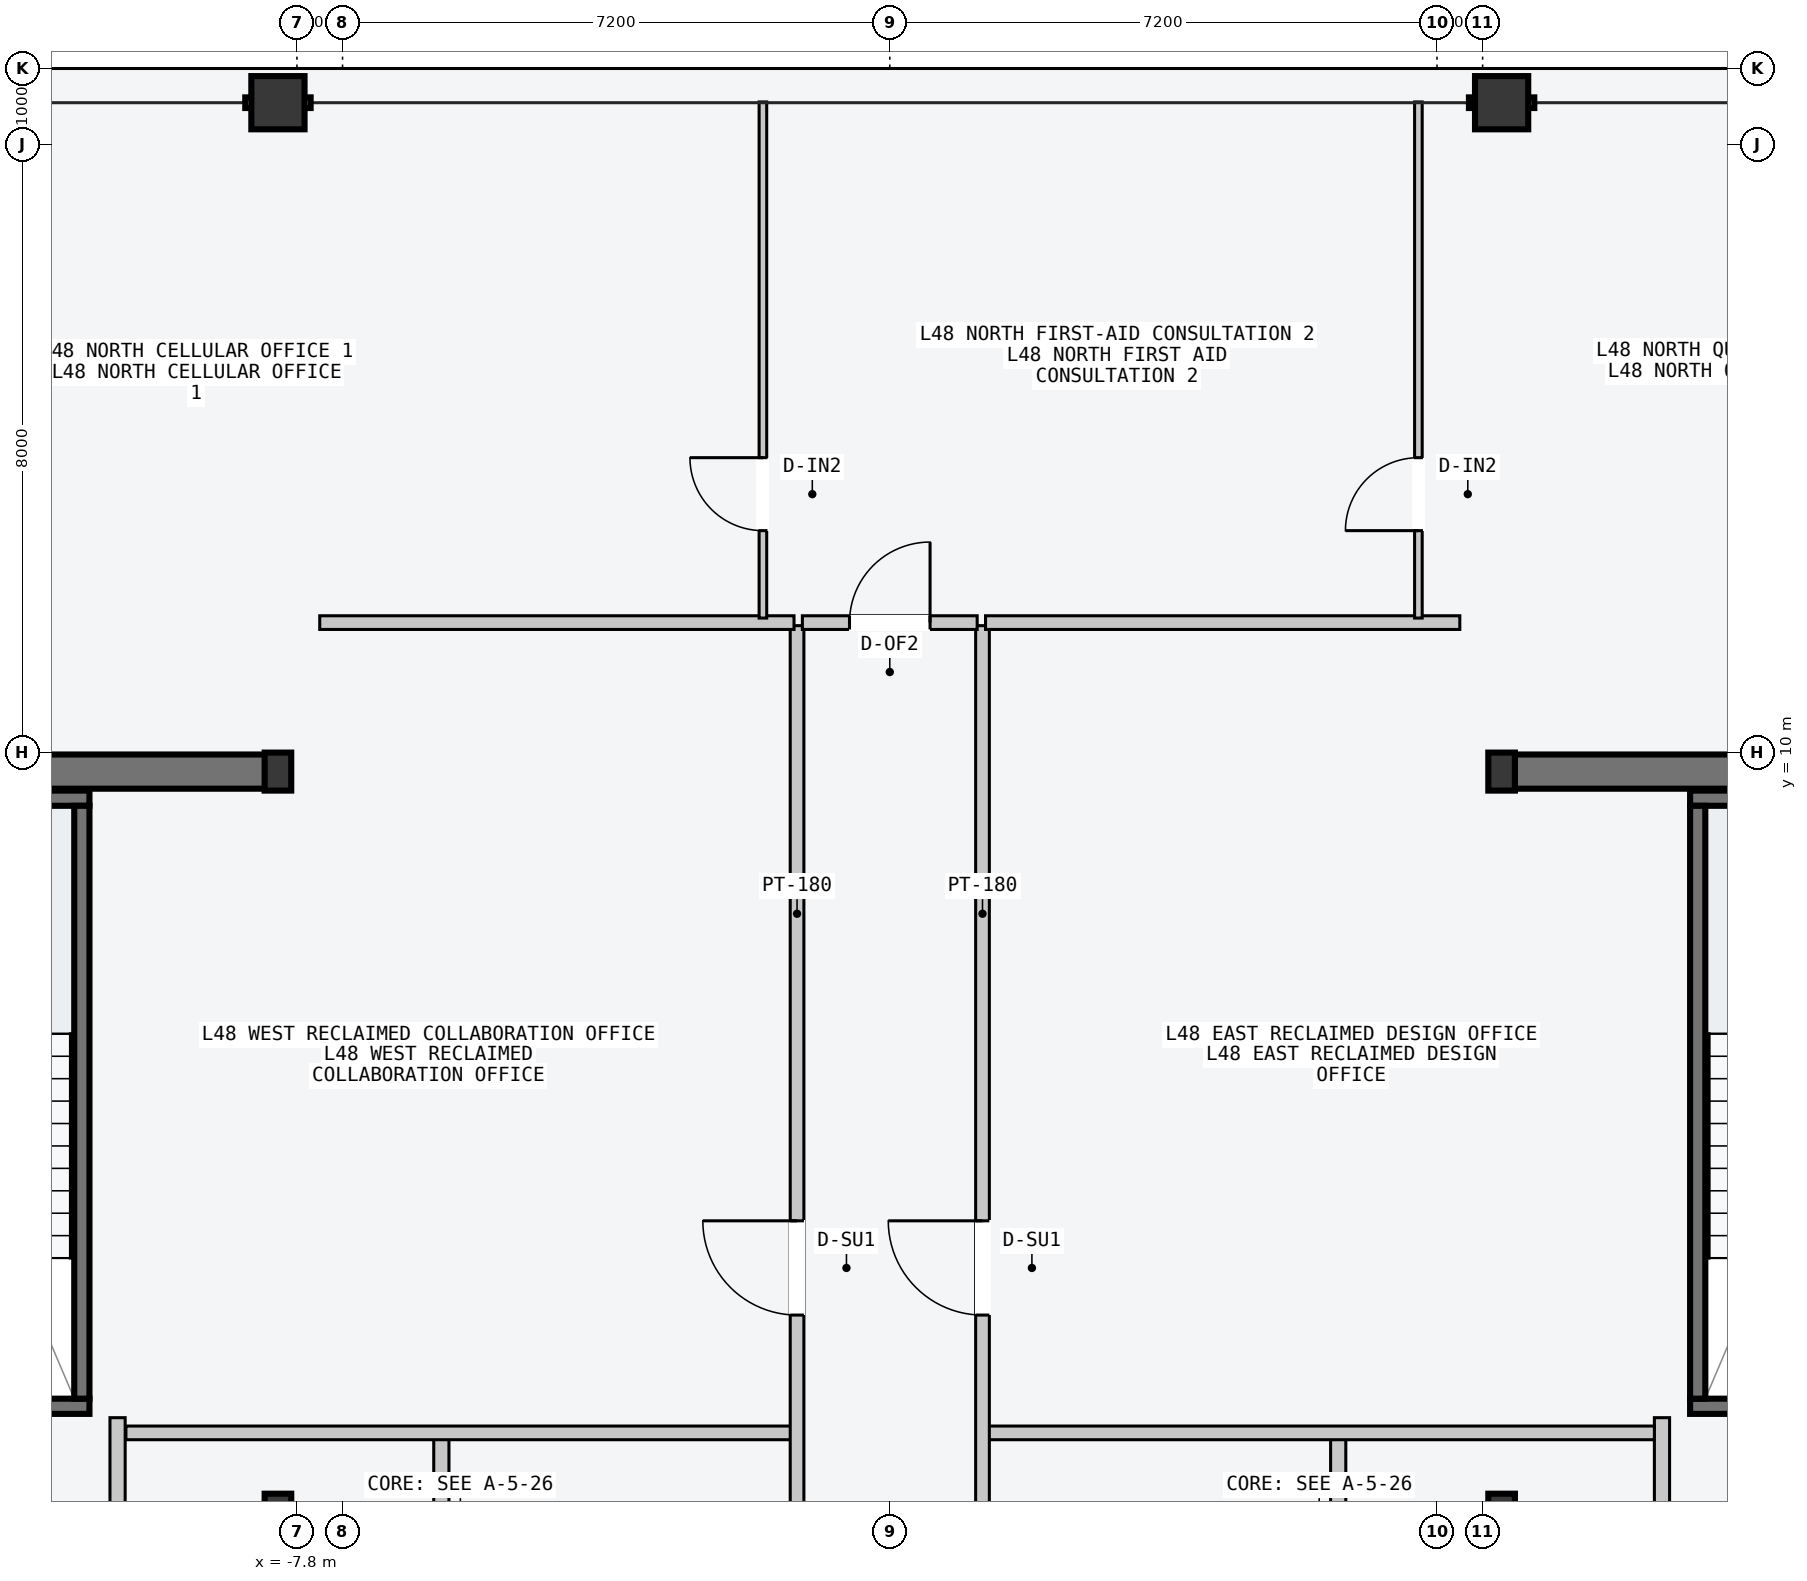
"""IFC4 building model, lengths in metres.
Left out: names, types, materials, properties, quantities, classifications, styles, units other than length and angle.
Written with IfcOpenShell. Run it as: python <this file> out.ifc"""

import sys

from ifc_helpers import new_model, si_unit, direction, frame, frame_2d, origin, origin_2d, place, context, subcontext, project, spatial, rectangle, hollow_rectangle, i_section, extrude, element, fill, save


model = new_model("IFC4")
c1 = context("Model", 3, precision=1e-05, world=origin(), true_north=direction((0.0, 1.0)))
c2 = subcontext(c1, "Body", "Model", "MODEL_VIEW")
j1 = project(units=[si_unit("LENGTHUNIT", "METRE"), si_unit("PLANEANGLEUNIT", "RADIAN")], contexts=[c1])
p1 = place(None, origin())
s1 = spatial("IfcSite", under=j1, at=p1, CompositionType="ELEMENT")
p2 = place(p1, origin())
s2 = spatial("IfcBuilding", under=s1, at=p2, CompositionType="ELEMENT")
p3 = place(p2, frame((0.0, 0.0, 183.9)))
s3 = spatial("IfcBuildingStorey", under=s2, at=p3, CompositionType="ELEMENT", Elevation=183.9)
for number, where, z_axis, x_axis in (
    (1, (-14.53, 9.75, -0.2), (0.0, 0.0, 1.0), (1.0, 0.0, 0.0)),
    (2, (8.07, 9.75, -0.2), (0.0, 0.0, 1.0), (1.0, 0.0, 0.0)),
):
    element("IfcWall", number, at=place(p3, frame(where, z_axis=z_axis, x_axis=x_axis)), inside=s3, PredefinedType="SHEAR", context=c2, shape_type="SweptSolid", body=[
        extrude(rectangle(XDim=6.46, YDim=0.45, at=frame_2d((3.23, 0.0))), origin(), (0.0, 0.0, 1.0), 3.6),
    ])
p4 = place(p3, frame((-14.25, 1.4, -0.2), z_axis=(0.0, 0.0, 1.0), x_axis=(1.0, 0.0, 0.0)))
e3 = element("IfcWall", 3, at=p4, inside=s3, PredefinedType="SOLIDWALL", context=c2, shape_type="SweptSolid", body=[
    extrude(rectangle(XDim=3.72, YDim=0.2, at=frame_2d((1.86, 0.0))), origin(), (0.0, 0.0, 1.0), 3.6),
])
p5 = place(p4, frame((1.5, 0.0, 0.2)))
e4 = element("IfcOpeningElement", 4, at=p5, cuts=e3, PredefinedType="OPENING", context=c2, shape_type="SweptSolid", body=[
    extrude(rectangle(XDim=1.12, YDim=2.18, at=frame_2d((0.56, 1.09))), frame((0.0, 0.11, 0.0), z_axis=(0.0, -1.0, 0.0), x_axis=(1.0, 0.0, 0.0)), (0.0, 0.0, 1.0), 0.22),
])
p6 = place(p3, frame((-14.25, 9.4, -0.2), z_axis=(0.0, 0.0, 1.0), x_axis=(1.0, 0.0, 0.0)))
e5 = element("IfcWall", 5, at=p6, inside=s3, PredefinedType="SOLIDWALL", context=c2, shape_type="SweptSolid", body=[
    extrude(rectangle(XDim=3.72, YDim=0.2, at=frame_2d((1.86, 0.0))), origin(), (0.0, 0.0, 1.0), 3.6),
])
p7 = place(p3, frame((-10.63, 1.5, -0.2), z_axis=(0.0, 0.0, 1.0), x_axis=(0.0, 1.0, 0.0)))
e6 = element("IfcWall", 6, at=p7, inside=s3, PredefinedType="SOLIDWALL", context=c2, shape_type="SweptSolid", body=[
    extrude(rectangle(XDim=7.8, YDim=0.2, at=frame_2d((3.9, 0.0))), origin(), (0.0, 0.0, 1.0), 3.6),
])
p8 = place(p3, frame((10.53, 1.4, -0.2), z_axis=(0.0, 0.0, 1.0), x_axis=(1.0, 0.0, 0.0)))
e7 = element("IfcWall", 7, at=p8, inside=s3, PredefinedType="SOLIDWALL", context=c2, shape_type="SweptSolid", body=[
    extrude(rectangle(XDim=3.72, YDim=0.2, at=frame_2d((1.86, 0.0))), origin(), (0.0, 0.0, 1.0), 3.6),
])
p9 = place(p8, frame((1.5, 0.0, 0.2)))
e8 = element("IfcOpeningElement", 8, at=p9, cuts=e7, PredefinedType="OPENING", context=c2, shape_type="SweptSolid", body=[
    extrude(rectangle(XDim=1.12, YDim=2.18, at=frame_2d((0.56, 1.09))), frame((0.0, 0.11, 0.0), z_axis=(0.0, -1.0, 0.0), x_axis=(1.0, 0.0, 0.0)), (0.0, 0.0, 1.0), 0.22),
])
p10 = place(p3, frame((10.53, 9.4, -0.2), z_axis=(0.0, 0.0, 1.0), x_axis=(1.0, 0.0, 0.0)))
e9 = element("IfcWall", 9, at=p10, inside=s3, PredefinedType="SOLIDWALL", context=c2, shape_type="SweptSolid", body=[
    extrude(rectangle(XDim=3.72, YDim=0.2, at=frame_2d((1.86, 0.0))), origin(), (0.0, 0.0, 1.0), 3.6),
])
p11 = place(p3, frame((10.63, 1.5, -0.2), z_axis=(0.0, 0.0, 1.0), x_axis=(0.0, 1.0, 0.0)))
e10 = element("IfcWall", 10, at=p11, inside=s3, PredefinedType="SOLIDWALL", context=c2, shape_type="SweptSolid", body=[
    extrude(rectangle(XDim=7.8, YDim=0.2, at=frame_2d((3.9, 0.0))), origin(), (0.0, 0.0, 1.0), 3.6),
])
for number, where, z_axis, x_axis in (
    (11, (-8.05, 0.0, 0.0), (0.0, 0.0, 1.0), (1.0, 0.0, 0.0)),
    (12, (-8.05, 9.75, 0.0), (0.0, 0.0, 1.0), (1.0, 0.0, 0.0)),
    (13, (8.05, 0.0, 0.0), (0.0, 0.0, 1.0), (1.0, 0.0, 0.0)),
    (14, (8.05, 9.75, 0.0), (0.0, 0.0, 1.0), (1.0, 0.0, 0.0)),
):
    element("IfcColumn", number, at=place(p3, frame(where, z_axis=z_axis, x_axis=x_axis)), inside=s3, PredefinedType="COLUMN", context=c2, shape_type="SweptSolid", body=[
        extrude(i_section(OverallWidth=0.35, OverallDepth=0.5, WebThickness=0.02, FlangeThickness=0.032, at=origin_2d()), origin(), (0.0, 0.0, 1.0), 3.6),
    ])
for number, where, z_axis, x_axis in (
    (15, (-8.05, 18.55, 0.0), (0.0, 0.0, 1.0), (1.0, 0.0, 0.0)),
    (16, (8.05, 18.55, 0.0), (0.0, 0.0, 1.0), (1.0, 0.0, 0.0)),
):
    element("IfcColumn", number, at=place(p3, frame(where, z_axis=z_axis, x_axis=x_axis)), inside=s3, PredefinedType="COLUMN", context=c2, shape_type="SweptSolid", body=[
        extrude(hollow_rectangle(XDim=0.7, YDim=0.7, WallThickness=0.03, at=origin_2d()), origin(), (0.0, 0.0, 1.0), 3.6),
    ])
p12 = place(p3, frame((-5.9, -9.45, 0.0), z_axis=(0.0, 0.0, 1.0), x_axis=(0.0, 1.0, 0.0)))
e17 = element("IfcWall", 17, at=p12, inside=s3, PredefinedType="PARTITIONING", context=c2, shape_type="SweptSolid", body=[
    extrude(rectangle(XDim=10.5, YDim=0.2, at=frame_2d((5.25, 0.0))), origin(), (0.0, 0.0, 1.0), 3.4),
])
p13 = place(p12, frame((3.9, 0.0, 0.0)))
e18 = element("IfcOpeningElement", 18, at=p13, cuts=e17, PredefinedType="OPENING", context=c2, shape_type="SweptSolid", body=[
    extrude(rectangle(XDim=1.5, YDim=2.2, at=frame_2d((0.75, 1.1))), frame((0.0, 0.11, 0.0), z_axis=(0.0, -1.0, 0.0), x_axis=(1.0, 0.0, 0.0)), (0.0, 0.0, 1.0), 0.22),
])
p14 = place(p3, frame((-10.16, -2.55, 0.0), z_axis=(0.0, 0.0, 1.0), x_axis=(0.0, 1.0, 0.0)))
e19 = element("IfcWall", 19, at=p14, inside=s3, PredefinedType="PARTITIONING", context=c2, shape_type="SweptSolid", body=[
    extrude(rectangle(XDim=3.8, YDim=0.2, at=frame_2d((1.9, 0.0))), origin(), (0.0, 0.0, 1.0), 3.4),
])
p15 = place(p14, frame((1.3, 0.0, 0.0)))
e20 = element("IfcOpeningElement", 20, at=p15, cuts=e19, PredefinedType="OPENING", context=c2, shape_type="SweptSolid", body=[
    extrude(rectangle(XDim=1.1, YDim=2.15, at=frame_2d((0.55, 1.075))), frame((0.0, 0.11, 0.0), z_axis=(0.0, -1.0, 0.0), x_axis=(1.0, 0.0, 0.0)), (0.0, 0.0, 1.0), 0.22),
])
p16 = place(p3, frame((5.9, -9.45, 0.0), z_axis=(0.0, 0.0, 1.0), x_axis=(0.0, 1.0, 0.0)))
e21 = element("IfcWall", 21, at=p16, inside=s3, PredefinedType="PARTITIONING", context=c2, shape_type="SweptSolid", body=[
    extrude(rectangle(XDim=10.5, YDim=0.2, at=frame_2d((5.25, 0.0))), origin(), (0.0, 0.0, 1.0), 3.4),
])
p17 = place(p16, frame((3.9, 0.0, 0.0)))
e22 = element("IfcOpeningElement", 22, at=p17, cuts=e21, PredefinedType="OPENING", context=c2, shape_type="SweptSolid", body=[
    extrude(rectangle(XDim=1.5, YDim=2.2, at=frame_2d((0.75, 1.1))), frame((0.0, 0.11, 0.0), z_axis=(0.0, -1.0, 0.0), x_axis=(1.0, 0.0, 0.0)), (0.0, 0.0, 1.0), 0.22),
])
p18 = place(p3, frame((10.16, -2.55, 0.0), z_axis=(0.0, 0.0, 1.0), x_axis=(0.0, 1.0, 0.0)))
e23 = element("IfcWall", 23, at=p18, inside=s3, PredefinedType="PARTITIONING", context=c2, shape_type="SweptSolid", body=[
    extrude(rectangle(XDim=3.8, YDim=0.2, at=frame_2d((1.9, 0.0))), origin(), (0.0, 0.0, 1.0), 3.4),
])
p19 = place(p18, frame((1.3, 0.0, 0.0)))
e24 = element("IfcOpeningElement", 24, at=p19, cuts=e23, PredefinedType="OPENING", context=c2, shape_type="SweptSolid", body=[
    extrude(rectangle(XDim=1.1, YDim=2.15, at=frame_2d((0.55, 1.075))), frame((0.0, 0.11, 0.0), z_axis=(0.0, -1.0, 0.0), x_axis=(1.0, 0.0, 0.0)), (0.0, 0.0, 1.0), 0.22),
])
p20 = place(p3, frame((-10.05, 1.05, 0.0), z_axis=(0.0, 0.0, 1.0), x_axis=(1.0, 0.0, 0.0)))
e25 = element("IfcWall", 25, at=p20, inside=s3, PredefinedType="PARTITIONING", context=c2, shape_type="SweptSolid", body=[
    extrude(rectangle(XDim=8.79, YDim=0.18, at=frame_2d((4.395, 0.0))), origin(), (0.0, 0.0, 1.0), 3.4),
])
p21 = place(p3, frame((-1.22, -3.5, 0.0), z_axis=(0.0, 0.0, 1.0), x_axis=(0.0, 1.0, 0.0)))
e26 = element("IfcWall", 26, at=p21, inside=s3, PredefinedType="PARTITIONING", context=c2, shape_type="SweptSolid", body=[
    extrude(rectangle(XDim=15.17, YDim=0.18, at=frame_2d((7.585, 0.0))), origin(), (0.0, 0.0, 1.0), 3.4),
])
p22 = place(p21, frame((6.1, 0.0, 0.0)))
e27 = element("IfcOpeningElement", 27, at=p22, cuts=e26, PredefinedType="OPENING", context=c2, shape_type="SweptSolid", body=[
    extrude(rectangle(XDim=1.24, YDim=2.24, at=frame_2d((0.62, 1.12))), frame((0.0, 0.1, 0.0), z_axis=(0.0, -1.0, 0.0), x_axis=(1.0, 0.0, 0.0)), (0.0, 0.0, 1.0), 0.2),
])
p23 = place(p21, frame((1.6, 0.0, 0.0)))
e28 = element("IfcOpeningElement", 28, at=p23, cuts=e26, PredefinedType="OPENING", context=c2, shape_type="SweptSolid", body=[
    extrude(rectangle(XDim=0.96, YDim=2.18, at=frame_2d((0.48, 1.09))), frame((0.0, 0.1, 0.0), z_axis=(0.0, -1.0, 0.0), x_axis=(1.0, 0.0, 0.0)), (0.0, 0.0, 1.0), 0.2),
])
p24 = place(p3, frame((-7.5, 11.71, 0.0), z_axis=(0.0, 0.0, 1.0), x_axis=(1.0, 0.0, 0.0)))
e29 = element("IfcWall", 29, at=p24, inside=s3, PredefinedType="PARTITIONING", context=c2, shape_type="SweptSolid", body=[
    extrude(rectangle(XDim=6.24, YDim=0.18, at=frame_2d((3.12, 0.0))), origin(), (0.0, 0.0, 1.0), 3.4),
])
p25 = place(p3, frame((1.26, 1.05, 0.0), z_axis=(0.0, 0.0, 1.0), x_axis=(1.0, 0.0, 0.0)))
e30 = element("IfcWall", 30, at=p25, inside=s3, PredefinedType="PARTITIONING", context=c2, shape_type="SweptSolid", body=[
    extrude(rectangle(XDim=8.8, YDim=0.18, at=frame_2d((4.4, 0.0))), origin(), (0.0, 0.0, 1.0), 3.4),
])
p26 = place(p3, frame((1.22, -3.5, 0.0), z_axis=(0.0, 0.0, 1.0), x_axis=(0.0, 1.0, 0.0)))
e31 = element("IfcWall", 31, at=p26, inside=s3, PredefinedType="PARTITIONING", context=c2, shape_type="SweptSolid", body=[
    extrude(rectangle(XDim=15.17, YDim=0.18, at=frame_2d((7.585, 0.0))), origin(), (0.0, 0.0, 1.0), 3.4),
])
p27 = place(p26, frame((6.1, 0.0, 0.0)))
e32 = element("IfcOpeningElement", 32, at=p27, cuts=e31, PredefinedType="OPENING", context=c2, shape_type="SweptSolid", body=[
    extrude(rectangle(XDim=1.24, YDim=2.24, at=frame_2d((0.62, 1.12))), frame((0.0, 0.1, 0.0), z_axis=(0.0, -1.0, 0.0), x_axis=(1.0, 0.0, 0.0)), (0.0, 0.0, 1.0), 0.2),
])
p28 = place(p26, frame((1.6, 0.0, 0.0)))
e33 = element("IfcOpeningElement", 33, at=p28, cuts=e31, PredefinedType="OPENING", context=c2, shape_type="SweptSolid", body=[
    extrude(rectangle(XDim=0.96, YDim=2.18, at=frame_2d((0.48, 1.09))), frame((0.0, 0.1, 0.0), z_axis=(0.0, -1.0, 0.0), x_axis=(1.0, 0.0, 0.0)), (0.0, 0.0, 1.0), 0.2),
])
p29 = place(p3, frame((1.26, 11.71, 0.0), z_axis=(0.0, 0.0, 1.0), x_axis=(1.0, 0.0, 0.0)))
e34 = element("IfcWall", 34, at=p29, inside=s3, PredefinedType="PARTITIONING", context=c2, shape_type="SweptSolid", body=[
    extrude(rectangle(XDim=6.24, YDim=0.18, at=frame_2d((3.12, 0.0))), origin(), (0.0, 0.0, 1.0), 3.4),
])
p30 = place(p3, frame((-1.669, 11.77, 0.0), z_axis=(0.0, 0.0, 1.0), x_axis=(0.0, 1.0, 0.0)))
e35 = element("IfcWall", 35, at=p30, inside=s3, PredefinedType="PARTITIONING", context=c2, shape_type="SweptSolid", body=[
    extrude(rectangle(XDim=6.79, YDim=0.1, at=frame_2d((3.395, 0.0))), origin(), (0.0, 0.0, 1.0), 3.4),
])
p31 = place(p30, frame((1.15, 0.0, 0.0)))
e36 = element("IfcOpeningElement", 36, at=p31, cuts=e35, PredefinedType="OPENING", context=c2, shape_type="SweptSolid", body=[
    extrude(rectangle(XDim=0.96, YDim=2.18, at=frame_2d((0.48, 1.09))), frame((0.0, 0.06, 0.0), z_axis=(0.0, -1.0, 0.0), x_axis=(1.0, 0.0, 0.0)), (0.0, 0.0, 1.0), 0.12),
])
p32 = place(p3, frame((6.955, 11.77, 0.0), z_axis=(0.0, 0.0, 1.0), x_axis=(0.0, 1.0, 0.0)))
e37 = element("IfcWall", 37, at=p32, inside=s3, PredefinedType="PARTITIONING", context=c2, shape_type="SweptSolid", body=[
    extrude(rectangle(XDim=6.79, YDim=0.1, at=frame_2d((3.395, 0.0))), origin(), (0.0, 0.0, 1.0), 3.4),
])
p33 = place(p32, frame((1.15, 0.0, 0.0)))
e38 = element("IfcOpeningElement", 38, at=p33, cuts=e37, PredefinedType="OPENING", context=c2, shape_type="SweptSolid", body=[
    extrude(rectangle(XDim=0.96, YDim=2.18, at=frame_2d((0.48, 1.09))), frame((0.0, 0.06, 0.0), z_axis=(0.0, -1.0, 0.0), x_axis=(1.0, 0.0, 0.0)), (0.0, 0.0, 1.0), 0.12),
])
p34 = place(p3, frame((-1.15, 11.71, 0.0), z_axis=(0.0, 0.0, 1.0), x_axis=(1.0, 0.0, 0.0)))
e39 = element("IfcWall", 39, at=p34, inside=s3, PredefinedType="PARTITIONING", context=c2, shape_type="SweptSolid", body=[
    extrude(rectangle(XDim=2.3, YDim=0.18, at=frame_2d((1.15, 0.0))), origin(), (0.0, 0.0, 1.0), 3.4),
])
p35 = place(p34, frame((0.62, 0.0, 0.0)))
e40 = element("IfcOpeningElement", 40, at=p35, cuts=e39, PredefinedType="OPENING", context=c2, shape_type="SweptSolid", body=[
    extrude(rectangle(XDim=1.06, YDim=2.2, at=frame_2d((0.53, 1.1))), frame((0.0, 0.1, 0.0), z_axis=(0.0, -1.0, 0.0), x_axis=(1.0, 0.0, 0.0)), (0.0, 0.0, 1.0), 0.2),
])
p36 = place(p22, origin())
e41 = element("IfcDoor", 41, at=p36, inside=s3, OperationType="SINGLE_SWING_RIGHT", PredefinedType="DOOR", context=c2, shape_type="SweptSolid", body=[
    extrude(rectangle(XDim=1.24, YDim=2.24, at=frame_2d((0.62, 1.12))), frame((0.0, 0.025, 0.0), z_axis=(0.0, -1.0, 0.0), x_axis=(1.0, 0.0, 0.0)), (0.0, 0.0, 1.0), 0.05),
])
fill(e27, e41)
p37 = place(p27, origin())
e42 = element("IfcDoor", 42, at=p37, inside=s3, OperationType="SINGLE_SWING_RIGHT", PredefinedType="DOOR", context=c2, shape_type="SweptSolid", body=[
    extrude(rectangle(XDim=1.24, YDim=2.24, at=frame_2d((0.62, 1.12))), frame((0.0, 0.025, 0.0), z_axis=(0.0, -1.0, 0.0), x_axis=(1.0, 0.0, 0.0)), (0.0, 0.0, 1.0), 0.05),
])
fill(e32, e42)
p38 = place(p31, origin())
e43 = element("IfcDoor", 43, at=p38, inside=s3, OperationType="SINGLE_SWING_RIGHT", PredefinedType="DOOR", context=c2, shape_type="SweptSolid", body=[
    extrude(rectangle(XDim=0.96, YDim=2.18, at=frame_2d((0.48, 1.09))), frame((0.0, 0.025, 0.0), z_axis=(0.0, -1.0, 0.0), x_axis=(1.0, 0.0, 0.0)), (0.0, 0.0, 1.0), 0.05),
])
fill(e36, e43)
p39 = place(p33, origin())
e44 = element("IfcDoor", 44, at=p39, inside=s3, OperationType="SINGLE_SWING_LEFT", PredefinedType="DOOR", context=c2, shape_type="SweptSolid", body=[
    extrude(rectangle(XDim=0.96, YDim=2.18, at=frame_2d((0.48, 1.09))), frame((0.0, 0.025, 0.0), z_axis=(0.0, -1.0, 0.0), x_axis=(1.0, 0.0, 0.0)), (0.0, 0.0, 1.0), 0.05),
])
fill(e38, e44)
p40 = place(p35, origin())
e45 = element("IfcDoor", 45, at=p40, inside=s3, OperationType="SINGLE_SWING_RIGHT", PredefinedType="DOOR", context=c2, shape_type="SweptSolid", body=[
    extrude(rectangle(XDim=1.06, YDim=2.2, at=frame_2d((0.53, 1.1))), frame((0.0, 0.025, 0.0), z_axis=(0.0, -1.0, 0.0), x_axis=(1.0, 0.0, 0.0)), (0.0, 0.0, 1.0), 0.05),
])
fill(e40, e45)
save(model, sys.argv[1])
